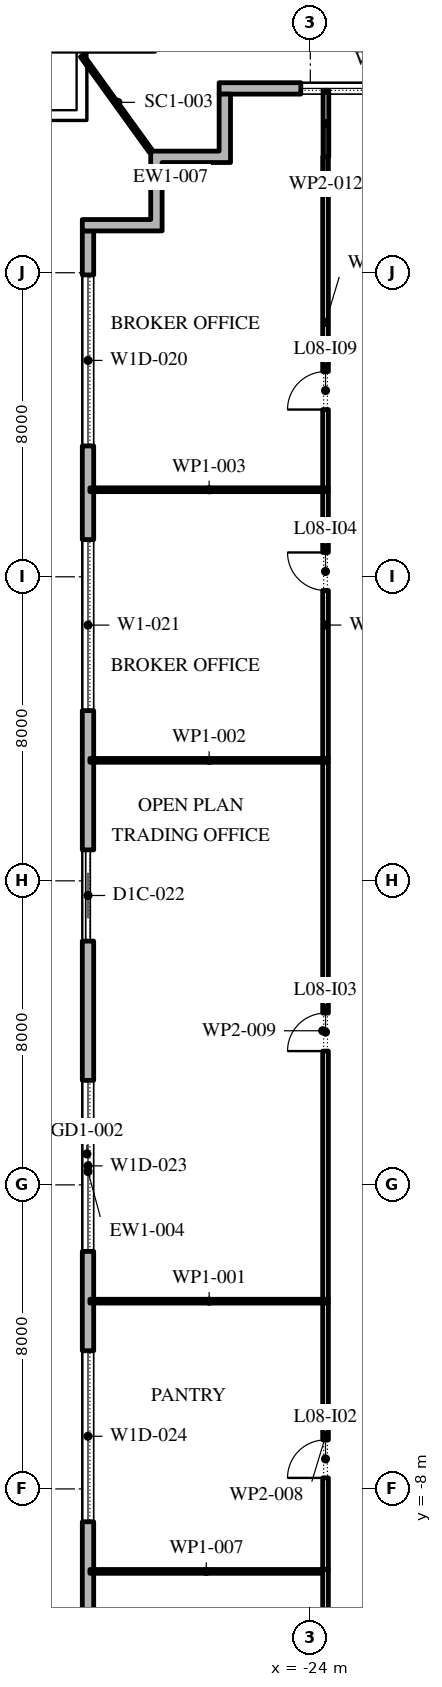
"""IFC4 building model, lengths in metres.
Left out: names, types, materials, properties, quantities, classifications, styles, units other than length and angle.
Written with IfcOpenShell. Run it as: python <this file> out.ifc"""

import sys

from ifc_helpers import new_model, si_unit, direction, frame, frame_2d, origin, place, context, subcontext, project, spatial, polyline, rectangle, outline, extrude, element, fill, save


model = new_model("IFC4")
c1 = context("Model", 3, precision=1e-05, world=origin(), true_north=direction((0.0, 1.0)))
c2 = subcontext(c1, "Body", "Model", "MODEL_VIEW")
j1 = project(units=[si_unit("LENGTHUNIT", "METRE"), si_unit("PLANEANGLEUNIT", "RADIAN")], contexts=[c1])
p1 = place(None, origin())
s1 = spatial("IfcSite", under=j1, at=p1, CompositionType="ELEMENT")
p2 = place(p1, origin())
s2 = spatial("IfcBuilding", under=s1, at=p2, CompositionType="ELEMENT")
p3 = place(p2, frame((0.0, 0.0, 43.8)))
s3 = spatial("IfcBuildingStorey", under=s2, at=p3, CompositionType="ELEMENT", Elevation=43.8)
p4 = place(p3, frame((26.1, 28.85, 0.0), z_axis=(0.0, 0.0, 1.0), x_axis=(-1.0, 0.0, 0.0)))
e1 = element("IfcWall", 1, at=p4, inside=s3, PredefinedType="STANDARD", context=c2, shape_type="SweptSolid", body=[
    extrude(rectangle(XDim=52.5, YDim=0.3, at=frame_2d((26.25, 0.0))), origin(), (0.0, 0.0, 1.0), 4.0),
])
p5 = place(p4, frame((2.0, 0.0, 0.45)))
e2 = element("IfcOpeningElement", 2, at=p5, cuts=e1, PredefinedType="OPENING", context=c2, shape_type="SweptSolid", body=[
    extrude(rectangle(XDim=4.5, YDim=3.05, at=frame_2d((2.25, 1.525))), frame((0.0, 0.16, 0.0), z_axis=(0.0, -1.0, 0.0), x_axis=(1.0, 0.0, 0.0)), (0.0, 0.0, 1.0), 0.32),
])
p6 = place(p4, frame((10.65, 0.0, 0.45)))
e3 = element("IfcOpeningElement", 3, at=p6, cuts=e1, PredefinedType="OPENING", context=c2, shape_type="SweptSolid", body=[
    extrude(rectangle(XDim=4.5, YDim=3.05, at=frame_2d((2.25, 1.525))), frame((0.0, 0.16, 0.0), z_axis=(0.0, -1.0, 0.0), x_axis=(1.0, 0.0, 0.0)), (0.0, 0.0, 1.0), 0.32),
])
p7 = place(p4, frame((20.5, 0.0, 0.0)))
e4 = element("IfcOpeningElement", 4, at=p7, cuts=e1, PredefinedType="OPENING", context=c2, shape_type="SweptSolid", body=[
    extrude(rectangle(XDim=2.4, YDim=3.5, at=frame_2d((1.2, 1.75))), frame((0.0, 0.16, 0.0), z_axis=(0.0, -1.0, 0.0), x_axis=(1.0, 0.0, 0.0)), (0.0, 0.0, 1.0), 0.32),
])
p8 = place(p4, frame((28.25, 0.0, 0.45)))
e5 = element("IfcOpeningElement", 5, at=p8, cuts=e1, PredefinedType="OPENING", context=c2, shape_type="SweptSolid", body=[
    extrude(rectangle(XDim=4.5, YDim=3.05, at=frame_2d((2.25, 1.525))), frame((0.0, 0.16, 0.0), z_axis=(0.0, -1.0, 0.0), x_axis=(1.0, 0.0, 0.0)), (0.0, 0.0, 1.0), 0.32),
])
p9 = place(p4, frame((37.05, 0.0, 0.45)))
e6 = element("IfcOpeningElement", 6, at=p9, cuts=e1, PredefinedType="OPENING", context=c2, shape_type="SweptSolid", body=[
    extrude(rectangle(XDim=4.5, YDim=3.05, at=frame_2d((2.25, 1.525))), frame((0.0, 0.16, 0.0), z_axis=(0.0, -1.0, 0.0), x_axis=(1.0, 0.0, 0.0)), (0.0, 0.0, 1.0), 0.32),
])
p10 = place(p4, frame((45.85, 0.0, 0.45)))
e7 = element("IfcOpeningElement", 7, at=p10, cuts=e1, PredefinedType="OPENING", context=c2, shape_type="SweptSolid", body=[
    extrude(rectangle(XDim=4.5, YDim=3.05, at=frame_2d((2.25, 1.525))), frame((0.0, 0.16, 0.0), z_axis=(0.0, -1.0, 0.0), x_axis=(1.0, 0.0, 0.0)), (0.0, 0.0, 1.0), 0.32),
])
p11 = place(p3, frame((-29.85, 25.1, 0.0), z_axis=(0.0, 0.0, 1.0), x_axis=(0.0, -1.0, 0.0)))
e8 = element("IfcWall", 8, at=p11, inside=s3, PredefinedType="STANDARD", context=c2, shape_type="SweptSolid", body=[
    extrude(rectangle(XDim=49.5, YDim=0.3, at=frame_2d((24.75, 0.0))), origin(), (0.0, 0.0, 1.0), 4.0),
])
p12 = place(p11, frame((1.157, 0.0, 0.45)))
e9 = element("IfcOpeningElement", 9, at=p12, cuts=e8, PredefinedType="OPENING", context=c2, shape_type="SweptSolid", body=[
    extrude(rectangle(XDim=4.5, YDim=2.875, at=frame_2d((2.25, 1.438))), frame((0.0, 0.16, 0.0), z_axis=(0.0, -1.0, 0.0), x_axis=(1.0, 0.0, 0.0)), (0.0, 0.0, 1.0), 0.32),
])
p13 = place(p11, frame((8.121, 0.0, 0.45)))
e10 = element("IfcOpeningElement", 10, at=p13, cuts=e8, PredefinedType="OPENING", context=c2, shape_type="SweptSolid", body=[
    extrude(rectangle(XDim=4.5, YDim=3.05, at=frame_2d((2.25, 1.525))), frame((0.0, 0.16, 0.0), z_axis=(0.0, -1.0, 0.0), x_axis=(1.0, 0.0, 0.0)), (0.0, 0.0, 1.0), 0.32),
])
p14 = place(p11, frame((16.286, 0.0, 0.0)))
e11 = element("IfcOpeningElement", 11, at=p14, cuts=e8, PredefinedType="OPENING", context=c2, shape_type="SweptSolid", body=[
    extrude(rectangle(XDim=2.4, YDim=3.325, at=frame_2d((1.2, 1.663))), frame((0.0, 0.16, 0.0), z_axis=(0.0, -1.0, 0.0), x_axis=(1.0, 0.0, 0.0)), (0.0, 0.0, 1.0), 0.32),
])
p15 = place(p11, frame((22.35, 0.0, 0.45)))
e12 = element("IfcOpeningElement", 12, at=p15, cuts=e8, PredefinedType="OPENING", context=c2, shape_type="SweptSolid", body=[
    extrude(rectangle(XDim=4.5, YDim=2.875, at=frame_2d((2.25, 1.438))), frame((0.0, 0.16, 0.0), z_axis=(0.0, -1.0, 0.0), x_axis=(1.0, 0.0, 0.0)), (0.0, 0.0, 1.0), 0.32),
])
p16 = place(p11, frame((29.464, 0.0, 0.45)))
e13 = element("IfcOpeningElement", 13, at=p16, cuts=e8, PredefinedType="OPENING", context=c2, shape_type="SweptSolid", body=[
    extrude(rectangle(XDim=4.5, YDim=2.875, at=frame_2d((2.25, 1.438))), frame((0.0, 0.16, 0.0), z_axis=(0.0, -1.0, 0.0), x_axis=(1.0, 0.0, 0.0)), (0.0, 0.0, 1.0), 0.32),
])
p17 = place(p11, frame((36.579, 0.0, 0.45)))
e14 = element("IfcOpeningElement", 14, at=p17, cuts=e8, PredefinedType="OPENING", context=c2, shape_type="SweptSolid", body=[
    extrude(rectangle(XDim=4.5, YDim=2.825, at=frame_2d((2.25, 1.413))), frame((0.0, 0.16, 0.0), z_axis=(0.0, -1.0, 0.0), x_axis=(1.0, 0.0, 0.0)), (0.0, 0.0, 1.0), 0.32),
])
p18 = place(p11, frame((44.743, 0.0, 0.0)))
e15 = element("IfcOpeningElement", 15, at=p18, cuts=e8, PredefinedType="OPENING", context=c2, shape_type="SweptSolid", body=[
    extrude(rectangle(XDim=2.4, YDim=3.5, at=frame_2d((1.2, 1.75))), frame((0.0, 0.16, 0.0), z_axis=(0.0, -1.0, 0.0), x_axis=(1.0, 0.0, 0.0)), (0.0, 0.0, 1.0), 0.32),
])
p19 = place(p3, origin())
e16 = element("IfcWall", 16, at=p19, inside=s3, PredefinedType="STANDARD", context=c2, shape_type="SweptSolid", body=[
    extrude(outline(polyline([(-28.2, 25.4), (-28.2, 27.2), (-26.4, 27.2), (-26.4, 28.7), (-26.1, 28.7), (-26.1, 26.9), (-27.9, 26.9), (-27.9, 25.1), (-30.0, 25.1), (-30.0, 25.4), (-28.2, 25.4)])), origin(), (0.0, 0.0, 1.0), 4.0),
])
p20 = place(p3, frame((-28.2, 27.2, -0.05), z_axis=(0.0, 0.0, 1.0), x_axis=(-0.585017780353, 0.811020466246, 0.0)))
e17 = element("IfcWall", 17, at=p20, inside=s3, PredefinedType="STANDARD", context=c2, shape_type="SweptSolid", body=[
    extrude(rectangle(XDim=3.093, YDim=0.1, at=frame_2d((1.546, 0.0))), origin(), (0.0, 0.0, 1.0), 4.05),
])
for number, where, z_axis, x_axis in (
    (18, (-29.8, -3.06, 0.0), (0.0, 0.0, 1.0), (1.0, 0.0, 0.0)),
    (19, (-29.8, 11.17, 0.0), (0.0, 0.0, 1.0), (1.0, 0.0, 0.0)),
    (20, (-29.8, 18.29, 0.0), (0.0, 0.0, 1.0), (1.0, 0.0, 0.0)),
):
    element("IfcWall", number, at=place(p3, frame(where, z_axis=z_axis, x_axis=x_axis)), inside=s3, PredefinedType="PARTITIONING", context=c2, shape_type="SweptSolid", body=[
        extrude(rectangle(XDim=6.275, YDim=0.1, at=frame_2d((3.138, 0.0))), origin(), (0.0, 0.0, 1.0), 4.0),
    ])
p21 = place(p3, frame((-23.6, -17.675, 0.0), z_axis=(0.0, 0.0, 1.0), x_axis=(0.0, 1.0, 0.0)))
e21 = element("IfcWall", 21, at=p21, inside=s3, PredefinedType="PARTITIONING", context=c2, shape_type="SweptSolid", body=[
    extrude(rectangle(XDim=7.555, YDim=0.15, at=frame_2d((3.777, 0.0))), origin(), (0.0, 0.0, 1.0), 4.0),
])
p22 = place(p3, frame((-23.675, -10.17, 0.0), z_axis=(0.0, 0.0, 1.0), x_axis=(-1.0, 0.0, 0.0)))
e22 = element("IfcWall", 22, at=p22, inside=s3, PredefinedType="PARTITIONING", context=c2, shape_type="SweptSolid", body=[
    extrude(rectangle(XDim=6.125, YDim=0.1, at=frame_2d((3.062, 0.0))), origin(), (0.0, 0.0, 1.0), 4.0),
])
p23 = place(p3, frame((-23.6, -10.12, 0.0), z_axis=(0.0, 0.0, 1.0), x_axis=(0.0, 1.0, 0.0)))
e23 = element("IfcWall", 23, at=p23, inside=s3, PredefinedType="PARTITIONING", context=c2, shape_type="SweptSolid", body=[
    extrude(rectangle(XDim=7.01, YDim=0.15, at=frame_2d((3.505, 0.0))), origin(), (0.0, 0.0, 1.0), 4.0),
])
p24 = place(p23, frame((2.41, 0.0, 0.0)))
e24 = element("IfcOpeningElement", 24, at=p24, cuts=e23, PredefinedType="OPENING", context=c2, shape_type="SweptSolid", body=[
    extrude(rectangle(XDim=1.0, YDim=2.1, at=frame_2d((0.5, 1.05))), frame((0.0, 0.085, 0.0), z_axis=(0.0, -1.0, 0.0), x_axis=(1.0, 0.0, 0.0)), (0.0, 0.0, 1.0), 0.17),
])
p25 = place(p3, frame((-23.6, -3.01, 0.0), z_axis=(0.0, 0.0, 1.0), x_axis=(0.0, 1.0, 0.0)))
e25 = element("IfcWall", 25, at=p25, inside=s3, PredefinedType="PARTITIONING", context=c2, shape_type="SweptSolid", body=[
    extrude(rectangle(XDim=14.13, YDim=0.15, at=frame_2d((7.065, 0.0))), origin(), (0.0, 0.0, 1.0), 4.0),
])
p26 = place(p25, frame((6.53, 0.0, 0.0)))
e26 = element("IfcOpeningElement", 26, at=p26, cuts=e25, PredefinedType="OPENING", context=c2, shape_type="SweptSolid", body=[
    extrude(rectangle(XDim=1.0, YDim=2.1, at=frame_2d((0.5, 1.05))), frame((0.0, 0.085, 0.0), z_axis=(0.0, -1.0, 0.0), x_axis=(1.0, 0.0, 0.0)), (0.0, 0.0, 1.0), 0.17),
])
p27 = place(p3, frame((-23.6, 11.22, 0.0), z_axis=(0.0, 0.0, 1.0), x_axis=(0.0, 1.0, 0.0)))
e27 = element("IfcWall", 27, at=p27, inside=s3, PredefinedType="PARTITIONING", context=c2, shape_type="SweptSolid", body=[
    extrude(rectangle(XDim=7.02, YDim=0.15, at=frame_2d((3.51, 0.0))), origin(), (0.0, 0.0, 1.0), 4.0),
])
p28 = place(p27, frame((4.42, 0.0, 0.0)))
e28 = element("IfcOpeningElement", 28, at=p28, cuts=e27, PredefinedType="OPENING", context=c2, shape_type="SweptSolid", body=[
    extrude(rectangle(XDim=1.0, YDim=2.1, at=frame_2d((0.5, 1.05))), frame((0.0, 0.085, 0.0), z_axis=(0.0, -1.0, 0.0), x_axis=(1.0, 0.0, 0.0)), (0.0, 0.0, 1.0), 0.17),
])
p29 = place(p3, frame((-23.6, 18.34, 0.0), z_axis=(0.0, 0.0, 1.0), x_axis=(0.0, 1.0, 0.0)))
e29 = element("IfcWall", 29, at=p29, inside=s3, PredefinedType="PARTITIONING", context=c2, shape_type="SweptSolid", body=[
    extrude(rectangle(XDim=8.71, YDim=0.15, at=frame_2d((4.355, 0.0))), origin(), (0.0, 0.0, 1.0), 4.0),
])
p30 = place(p29, frame((2.06, 0.0, 0.0)))
e30 = element("IfcOpeningElement", 30, at=p30, cuts=e29, PredefinedType="OPENING", context=c2, shape_type="SweptSolid", body=[
    extrude(rectangle(XDim=1.0, YDim=2.1, at=frame_2d((0.5, 1.05))), frame((0.0, 0.085, 0.0), z_axis=(0.0, -1.0, 0.0), x_axis=(1.0, 0.0, 0.0)), (0.0, 0.0, 1.0), 0.17),
])
p31 = place(p3, frame((-23.59, 27.05, 0.0), z_axis=(0.0, 0.0, 1.0), x_axis=(0.0, 1.0, 0.0)))
e31 = element("IfcWall", 31, at=p31, inside=s3, PredefinedType="PARTITIONING", context=c2, shape_type="SweptSolid", body=[
    extrude(rectangle(XDim=1.75, YDim=0.15, at=frame_2d((0.875, 0.0))), origin(), (0.0, 0.0, 1.0), 4.0),
])
p32 = place(p10, origin())
e32 = element("IfcWindow", 32, at=p32, inside=s3, PartitioningType="DOUBLE_PANEL_VERTICAL", PredefinedType="WINDOW", context=c2, shape_type="SweptSolid", body=[
    extrude(rectangle(XDim=4.5, YDim=3.05, at=frame_2d((2.25, 1.525))), frame((0.0, 0.03, 0.0), z_axis=(0.0, -1.0, 0.0), x_axis=(1.0, 0.0, 0.0)), (0.0, 0.0, 1.0), 0.06),
])
fill(e7, e32)
p33 = place(p12, origin())
e33 = element("IfcWindow", 33, at=p33, inside=s3, PartitioningType="DOUBLE_PANEL_VERTICAL", PredefinedType="WINDOW", context=c2, shape_type="SweptSolid", body=[
    extrude(rectangle(XDim=4.5, YDim=2.875, at=frame_2d((2.25, 1.438))), frame((0.0, 0.03, 0.0), z_axis=(0.0, -1.0, 0.0), x_axis=(1.0, 0.0, 0.0)), (0.0, 0.0, 1.0), 0.06),
])
fill(e9, e33)
p34 = place(p13, origin())
e34 = element("IfcWindow", 34, at=p34, inside=s3, PartitioningType="DOUBLE_PANEL_VERTICAL", PredefinedType="WINDOW", context=c2, shape_type="SweptSolid", body=[
    extrude(rectangle(XDim=4.5, YDim=3.05, at=frame_2d((2.25, 1.525))), frame((0.0, 0.03, 0.0), z_axis=(0.0, -1.0, 0.0), x_axis=(1.0, 0.0, 0.0)), (0.0, 0.0, 1.0), 0.06),
])
fill(e10, e34)
p35 = place(p14, origin())
e35 = element("IfcDoor", 35, at=p35, inside=s3, OperationType="DOUBLE_DOOR_SLIDING", PredefinedType="DOOR", context=c2, shape_type="SweptSolid", body=[
    extrude(rectangle(XDim=2.4, YDim=3.325, at=frame_2d((1.2, 1.663))), frame((0.0, 0.025, 0.0), z_axis=(0.0, -1.0, 0.0), x_axis=(1.0, 0.0, 0.0)), (0.0, 0.0, 1.0), 0.05),
])
fill(e11, e35)
p36 = place(p15, origin())
e36 = element("IfcWindow", 36, at=p36, inside=s3, PartitioningType="DOUBLE_PANEL_VERTICAL", PredefinedType="WINDOW", context=c2, shape_type="SweptSolid", body=[
    extrude(rectangle(XDim=4.5, YDim=2.875, at=frame_2d((2.25, 1.438))), frame((0.0, 0.03, 0.0), z_axis=(0.0, -1.0, 0.0), x_axis=(1.0, 0.0, 0.0)), (0.0, 0.0, 1.0), 0.06),
])
fill(e12, e36)
p37 = place(p16, origin())
e37 = element("IfcWindow", 37, at=p37, inside=s3, PartitioningType="DOUBLE_PANEL_VERTICAL", PredefinedType="WINDOW", context=c2, shape_type="SweptSolid", body=[
    extrude(rectangle(XDim=4.5, YDim=2.875, at=frame_2d((2.25, 1.438))), frame((0.0, 0.03, 0.0), z_axis=(0.0, -1.0, 0.0), x_axis=(1.0, 0.0, 0.0)), (0.0, 0.0, 1.0), 0.06),
])
fill(e13, e37)
p38 = place(p24, origin())
e38 = element("IfcDoor", 38, at=p38, inside=s3, OperationType="SINGLE_SWING_RIGHT", PredefinedType="DOOR", context=c2, shape_type="SweptSolid", body=[
    extrude(rectangle(XDim=1.0, YDim=2.1, at=frame_2d((0.5, 1.05))), frame((0.0, 0.025, 0.0), z_axis=(0.0, -1.0, 0.0), x_axis=(1.0, 0.0, 0.0)), (0.0, 0.0, 1.0), 0.05),
])
fill(e24, e38)
p39 = place(p26, origin())
e39 = element("IfcDoor", 39, at=p39, inside=s3, OperationType="SINGLE_SWING_RIGHT", PredefinedType="DOOR", context=c2, shape_type="SweptSolid", body=[
    extrude(rectangle(XDim=1.0, YDim=2.1, at=frame_2d((0.5, 1.05))), frame((0.0, 0.025, 0.0), z_axis=(0.0, -1.0, 0.0), x_axis=(1.0, 0.0, 0.0)), (0.0, 0.0, 1.0), 0.05),
])
fill(e26, e39)
p40 = place(p28, origin())
e40 = element("IfcDoor", 40, at=p40, inside=s3, OperationType="SINGLE_SWING_LEFT", PredefinedType="DOOR", context=c2, shape_type="SweptSolid", body=[
    extrude(rectangle(XDim=1.0, YDim=2.1, at=frame_2d((0.5, 1.05))), frame((0.0, 0.025, 0.0), z_axis=(0.0, -1.0, 0.0), x_axis=(1.0, 0.0, 0.0)), (0.0, 0.0, 1.0), 0.05),
])
fill(e28, e40)
p41 = place(p30, origin())
e41 = element("IfcDoor", 41, at=p41, inside=s3, OperationType="SINGLE_SWING_RIGHT", PredefinedType="DOOR", context=c2, shape_type="SweptSolid", body=[
    extrude(rectangle(XDim=1.0, YDim=2.1, at=frame_2d((0.5, 1.05))), frame((0.0, 0.025, 0.0), z_axis=(0.0, -1.0, 0.0), x_axis=(1.0, 0.0, 0.0)), (0.0, 0.0, 1.0), 0.05),
])
fill(e30, e41)
save(model, sys.argv[1])
